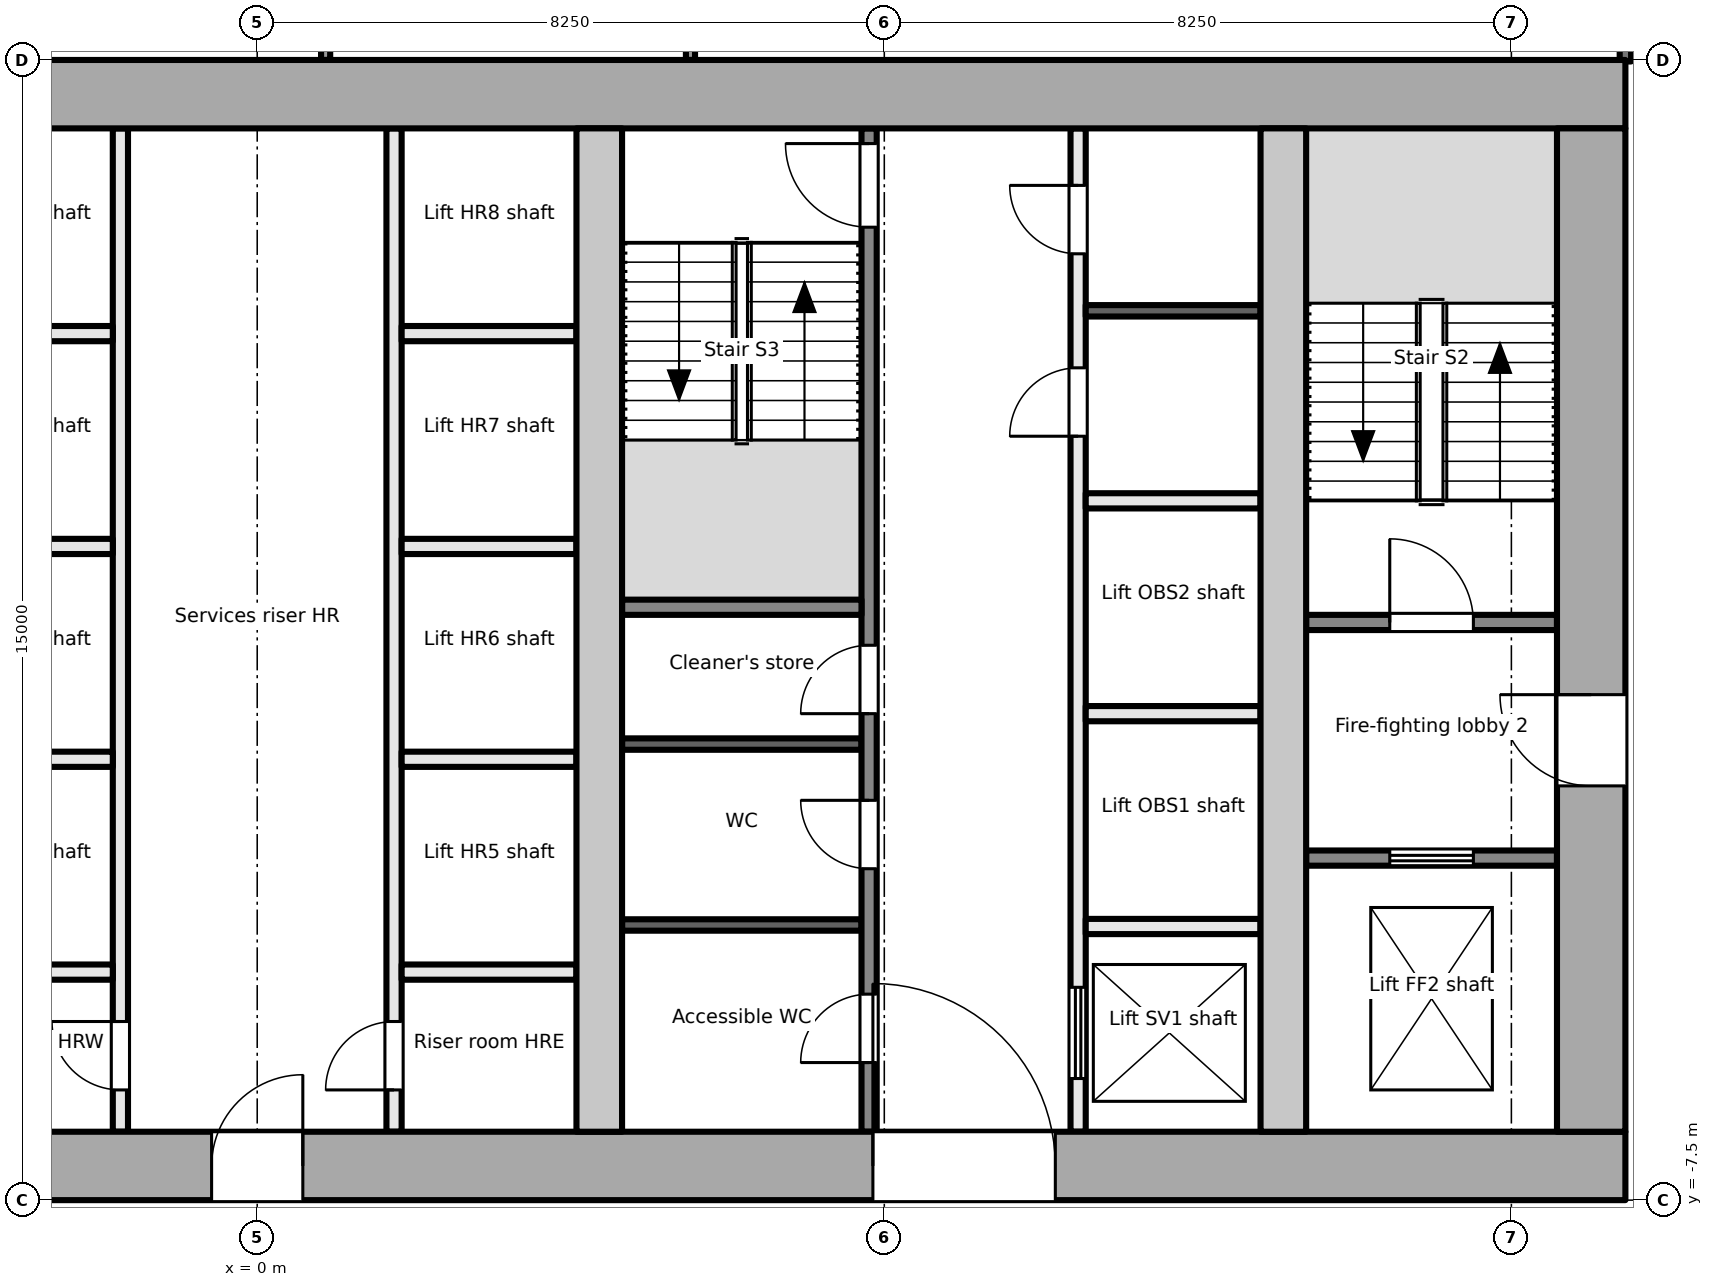
"""IFC4 building model, lengths in metres.
Left out: names, types, materials, properties, quantities, classifications, styles, units other than length and angle.
Written with IfcOpenShell. Run it as: python <this file> out.ifc"""

import sys

from ifc_helpers import new_model, si_unit, direction, frame, frame_2d, origin, place, context, subcontext, project, spatial, rectangle, extrude, element, fill, save


model = new_model("IFC4")
c1 = context("Model", 3, precision=1e-05, world=origin(), true_north=direction((0.0, 1.0)))
c2 = subcontext(c1, "Body", "Model", "MODEL_VIEW")
j1 = project(units=[si_unit("LENGTHUNIT", "METRE"), si_unit("PLANEANGLEUNIT", "RADIAN")], contexts=[c1])
p1 = place(None, origin())
s1 = spatial("IfcSite", under=j1, at=p1, CompositionType="ELEMENT")
p2 = place(p1, origin())
s2 = spatial("IfcBuilding", under=s1, at=p2, CompositionType="ELEMENT")
p3 = place(p2, frame((0.0, 0.0, 107.7)))
s3 = spatial("IfcBuildingStorey", under=s2, at=p3, CompositionType="ELEMENT", Elevation=107.7)
p4 = place(p3, frame((-18.0, -7.05, -0.2), z_axis=(0.0, 0.0, 1.0), x_axis=(1.0, 0.0, 0.0)))
e1 = element("IfcWall", 1, at=p4, inside=s3, PredefinedType="SHEAR", context=c2, shape_type="SweptSolid", body=[
    extrude(rectangle(XDim=36.0, YDim=0.9, at=frame_2d((18.0, 0.0))), origin(), (0.0, 0.0, 1.0), 4.0),
])
p5 = place(p4, frame((7.8, 0.0, 0.2)))
e2 = element("IfcOpeningElement", 2, at=p5, cuts=e1, PredefinedType="OPENING", context=c2, shape_type="SweptSolid", body=[
    extrude(rectangle(XDim=2.4, YDim=2.1, at=frame_2d((1.2, 1.05))), frame((0.0, 0.46, 0.0), z_axis=(0.0, -1.0, 0.0), x_axis=(1.0, 0.0, 0.0)), (0.0, 0.0, 1.0), 0.921),
])
p6 = place(p4, frame((17.4, 0.0, 0.2)))
e3 = element("IfcOpeningElement", 3, at=p6, cuts=e1, PredefinedType="OPENING", context=c2, shape_type="SweptSolid", body=[
    extrude(rectangle(XDim=1.2, YDim=2.1, at=frame_2d((0.6, 1.05))), frame((0.0, 0.46, 0.0), z_axis=(0.0, -1.0, 0.0), x_axis=(1.0, 0.0, 0.0)), (0.0, 0.0, 1.0), 0.921),
])
p7 = place(p4, frame((26.1, 0.0, 0.2)))
e4 = element("IfcOpeningElement", 4, at=p7, cuts=e1, PredefinedType="OPENING", context=c2, shape_type="SweptSolid", body=[
    extrude(rectangle(XDim=2.4, YDim=2.1, at=frame_2d((1.2, 1.05))), frame((0.0, 0.46, 0.0), z_axis=(0.0, -1.0, 0.0), x_axis=(1.0, 0.0, 0.0)), (0.0, 0.0, 1.0), 0.921),
])
p8 = place(p3, frame((-18.0, 7.05, -0.2), z_axis=(0.0, 0.0, 1.0), x_axis=(1.0, 0.0, 0.0)))
e5 = element("IfcWall", 5, at=p8, inside=s3, PredefinedType="SHEAR", context=c2, shape_type="SweptSolid", body=[
    extrude(rectangle(XDim=36.0, YDim=0.9, at=frame_2d((18.0, 0.0))), origin(), (0.0, 0.0, 1.0), 4.0),
])
p9 = place(p3, frame((17.55, -6.6, -0.2), z_axis=(0.0, 0.0, 1.0), x_axis=(0.0, 1.0, 0.0)))
e6 = element("IfcWall", 6, at=p9, inside=s3, PredefinedType="SHEAR", context=c2, shape_type="SweptSolid", body=[
    extrude(rectangle(XDim=13.2, YDim=0.9, at=frame_2d((6.6, 0.0))), origin(), (0.0, 0.0, 1.0), 4.0),
])
p10 = place(p9, frame((4.55, 0.0, 0.2)))
e7 = element("IfcOpeningElement", 7, at=p10, cuts=e6, PredefinedType="OPENING", context=c2, shape_type="SweptSolid", body=[
    extrude(rectangle(XDim=1.2, YDim=2.1, at=frame_2d((0.6, 1.05))), frame((0.0, 0.46, 0.0), z_axis=(0.0, -1.0, 0.0), x_axis=(1.0, 0.0, 0.0)), (0.0, 0.0, 1.0), 0.921),
])
for number, where, z_axis, x_axis in (
    (8, (4.5, -6.6, -0.2), (0.0, 0.0, 1.0), (0.0, 1.0, 0.0)),
    (9, (13.5, -6.6, -0.2), (0.0, 0.0, 1.0), (0.0, 1.0, 0.0)),
):
    element("IfcWall", number, at=place(p3, frame(where, z_axis=z_axis, x_axis=x_axis)), inside=s3, PredefinedType="SHEAR", context=c2, shape_type="SweptSolid", body=[
        extrude(rectangle(XDim=13.2, YDim=0.6, at=frame_2d((6.6, 0.0))), origin(), (0.0, 0.0, 1.0), 4.0),
    ])
p11 = place(p3, frame((13.8, -3.0, 0.0), z_axis=(0.0, 0.0, 1.0), x_axis=(1.0, 0.0, 0.0)))
e10 = element("IfcWall", 10, at=p11, inside=s3, PredefinedType="PARTITIONING", context=c2, shape_type="SweptSolid", body=[
    extrude(rectangle(XDim=3.3, YDim=0.2, at=frame_2d((1.65, 0.0))), origin(), (0.0, 0.0, 1.0), 3.8),
])
p12 = place(p11, frame((1.1, 0.0, 0.0)))
e11 = element("IfcOpeningElement", 11, at=p12, cuts=e10, PredefinedType="OPENING", context=c2, shape_type="SweptSolid", body=[
    extrude(rectangle(XDim=1.1, YDim=2.1, at=frame_2d((0.55, 1.05))), frame((0.0, 0.111, 0.0), z_axis=(0.0, -1.0, 0.0), x_axis=(1.0, 0.0, 0.0)), (0.0, 0.0, 1.0), 0.221),
])
p13 = place(p3, frame((13.8, 0.1, 0.0), z_axis=(0.0, 0.0, 1.0), x_axis=(1.0, 0.0, 0.0)))
e12 = element("IfcWall", 12, at=p13, inside=s3, PredefinedType="PARTITIONING", context=c2, shape_type="SweptSolid", body=[
    extrude(rectangle(XDim=3.3, YDim=0.2, at=frame_2d((1.65, 0.0))), origin(), (0.0, 0.0, 1.0), 3.8),
])
p14 = place(p13, frame((1.1, 0.0, 0.0)))
e13 = element("IfcOpeningElement", 13, at=p14, cuts=e12, PredefinedType="OPENING", context=c2, shape_type="SweptSolid", body=[
    extrude(rectangle(XDim=1.1, YDim=2.1, at=frame_2d((0.55, 1.05))), frame((0.0, 0.111, 0.0), z_axis=(0.0, -1.0, 0.0), x_axis=(1.0, 0.0, 0.0)), (0.0, 0.0, 1.0), 0.221),
])
p15 = place(p3, frame((-1.8, -6.6, 0.0), z_axis=(0.0, 0.0, 1.0), x_axis=(0.0, 1.0, 0.0)))
e14 = element("IfcWall", 14, at=p15, inside=s3, PredefinedType="PARTITIONING", context=c2, shape_type="SweptSolid", body=[
    extrude(rectangle(XDim=13.2, YDim=0.2, at=frame_2d((6.6, 0.0))), origin(), (0.0, 0.0, 1.0), 3.8),
])
p16 = place(p15, frame((0.55, 0.0, 0.0)))
e15 = element("IfcOpeningElement", 15, at=p16, cuts=e14, PredefinedType="OPENING", context=c2, shape_type="SweptSolid", body=[
    extrude(rectangle(XDim=0.9, YDim=2.1, at=frame_2d((0.45, 1.05))), frame((0.0, 0.111, 0.0), z_axis=(0.0, -1.0, 0.0), x_axis=(1.0, 0.0, 0.0)), (0.0, 0.0, 1.0), 0.221),
])
p17 = place(p3, frame((1.8, -6.6, 0.0), z_axis=(0.0, 0.0, 1.0), x_axis=(0.0, 1.0, 0.0)))
e16 = element("IfcWall", 16, at=p17, inside=s3, PredefinedType="PARTITIONING", context=c2, shape_type="SweptSolid", body=[
    extrude(rectangle(XDim=13.2, YDim=0.2, at=frame_2d((6.6, 0.0))), origin(), (0.0, 0.0, 1.0), 3.8),
])
p18 = place(p17, frame((0.55, 0.0, 0.0)))
e17 = element("IfcOpeningElement", 17, at=p18, cuts=e16, PredefinedType="OPENING", context=c2, shape_type="SweptSolid", body=[
    extrude(rectangle(XDim=0.9, YDim=2.1, at=frame_2d((0.45, 1.05))), frame((0.0, 0.111, 0.0), z_axis=(0.0, -1.0, 0.0), x_axis=(1.0, 0.0, 0.0)), (0.0, 0.0, 1.0), 0.221),
])
for number, where, z_axis, x_axis in (
    (18, (-4.2, -1.7, 0.0), (0.0, 0.0, 1.0), (1.0, 0.0, 0.0)),
    (19, (-4.2, 1.1, 0.0), (0.0, 0.0, 1.0), (1.0, 0.0, 0.0)),
    (20, (-4.2, 3.9, 0.0), (0.0, 0.0, 1.0), (1.0, 0.0, 0.0)),
    (21, (-4.2, -4.5, 0.0), (0.0, 0.0, 1.0), (1.0, 0.0, 0.0)),
    (22, (1.9, -1.7, 0.0), (0.0, 0.0, 1.0), (1.0, 0.0, 0.0)),
    (23, (1.9, 1.1, 0.0), (0.0, 0.0, 1.0), (1.0, 0.0, 0.0)),
    (24, (1.9, 3.9, 0.0), (0.0, 0.0, 1.0), (1.0, 0.0, 0.0)),
    (25, (1.9, -4.5, 0.0), (0.0, 0.0, 1.0), (1.0, 0.0, 0.0)),
):
    element("IfcWall", number, at=place(p3, frame(where, z_axis=z_axis, x_axis=x_axis)), inside=s3, PredefinedType="PARTITIONING", context=c2, shape_type="SweptSolid", body=[
        extrude(rectangle(XDim=2.3, YDim=0.2, at=frame_2d((1.15, 0.0))), origin(), (0.0, 0.0, 1.0), 3.8),
    ])
p19 = place(p3, frame((8.05, -6.6, 0.0), z_axis=(0.0, 0.0, 1.0), x_axis=(0.0, 1.0, 0.0)))
e26 = element("IfcWall", 26, at=p19, inside=s3, PredefinedType="PARTITIONING", context=c2, shape_type="SweptSolid", body=[
    extrude(rectangle(XDim=13.2, YDim=0.2, at=frame_2d((6.6, 0.0))), origin(), (0.0, 0.0, 1.0), 3.8),
])
p20 = place(p19, frame((0.91, 0.0, 0.0)))
e27 = element("IfcOpeningElement", 27, at=p20, cuts=e26, PredefinedType="OPENING", context=c2, shape_type="SweptSolid", body=[
    extrude(rectangle(XDim=0.9, YDim=2.1, at=frame_2d((0.45, 1.05))), frame((0.0, 0.111, 0.0), z_axis=(0.0, -1.0, 0.0), x_axis=(1.0, 0.0, 0.0)), (0.0, 0.0, 1.0), 0.221),
])
p21 = place(p19, frame((3.46, 0.0, 0.0)))
e28 = element("IfcOpeningElement", 28, at=p21, cuts=e26, PredefinedType="OPENING", context=c2, shape_type="SweptSolid", body=[
    extrude(rectangle(XDim=0.9, YDim=2.1, at=frame_2d((0.45, 1.05))), frame((0.0, 0.111, 0.0), z_axis=(0.0, -1.0, 0.0), x_axis=(1.0, 0.0, 0.0)), (0.0, 0.0, 1.0), 0.221),
])
p22 = place(p19, frame((5.5, 0.0, 0.0)))
e29 = element("IfcOpeningElement", 29, at=p22, cuts=e26, PredefinedType="OPENING", context=c2, shape_type="SweptSolid", body=[
    extrude(rectangle(XDim=0.9, YDim=2.1, at=frame_2d((0.45, 1.05))), frame((0.0, 0.111, 0.0), z_axis=(0.0, -1.0, 0.0), x_axis=(1.0, 0.0, 0.0)), (0.0, 0.0, 1.0), 0.221),
])
p23 = place(p19, frame((11.9, 0.0, 0.0)))
e30 = element("IfcOpeningElement", 30, at=p23, cuts=e26, PredefinedType="OPENING", context=c2, shape_type="SweptSolid", body=[
    extrude(rectangle(XDim=1.1, YDim=2.1, at=frame_2d((0.55, 1.05))), frame((0.0, 0.111, 0.0), z_axis=(0.0, -1.0, 0.0), x_axis=(1.0, 0.0, 0.0)), (0.0, 0.0, 1.0), 0.221),
])
p24 = place(p3, frame((10.8, -6.6, 0.0), z_axis=(0.0, 0.0, 1.0), x_axis=(0.0, 1.0, 0.0)))
e31 = element("IfcWall", 31, at=p24, inside=s3, PredefinedType="PARTITIONING", context=c2, shape_type="SweptSolid", body=[
    extrude(rectangle(XDim=13.2, YDim=0.2, at=frame_2d((6.6, 0.0))), origin(), (0.0, 0.0, 1.0), 3.8),
])
p25 = place(p24, frame((0.7, 0.0, 0.0)))
e32 = element("IfcOpeningElement", 32, at=p25, cuts=e31, PredefinedType="OPENING", context=c2, shape_type="SweptSolid", body=[
    extrude(rectangle(XDim=1.2, YDim=2.1, at=frame_2d((0.6, 1.05))), frame((0.0, 0.111, 0.0), z_axis=(0.0, -1.0, 0.0), x_axis=(1.0, 0.0, 0.0)), (0.0, 0.0, 1.0), 0.221),
])
p26 = place(p24, frame((9.15, 0.0, 0.0)))
e33 = element("IfcOpeningElement", 33, at=p26, cuts=e31, PredefinedType="OPENING", context=c2, shape_type="SweptSolid", body=[
    extrude(rectangle(XDim=0.9, YDim=2.1, at=frame_2d((0.45, 1.05))), frame((0.0, 0.111, 0.0), z_axis=(0.0, -1.0, 0.0), x_axis=(1.0, 0.0, 0.0)), (0.0, 0.0, 1.0), 0.221),
])
p27 = place(p24, frame((11.55, 0.0, 0.0)))
e34 = element("IfcOpeningElement", 34, at=p27, cuts=e31, PredefinedType="OPENING", context=c2, shape_type="SweptSolid", body=[
    extrude(rectangle(XDim=0.9, YDim=2.1, at=frame_2d((0.45, 1.05))), frame((0.0, 0.111, 0.0), z_axis=(0.0, -1.0, 0.0), x_axis=(1.0, 0.0, 0.0)), (0.0, 0.0, 1.0), 0.221),
])
p28 = place(p3, frame((4.8, 0.3, 0.0), z_axis=(0.0, 0.0, 1.0), x_axis=(1.0, 0.0, 0.0)))
e35 = element("IfcWall", 35, at=p28, inside=s3, PredefinedType="PARTITIONING", context=c2, shape_type="SweptSolid", body=[
    extrude(rectangle(XDim=3.15, YDim=0.2, at=frame_2d((1.575, 0.0))), origin(), (0.0, 0.0, 1.0), 3.8),
])
for number, where, z_axis, x_axis in (
    (36, (4.8, -3.88, 0.0), (0.0, 0.0, 1.0), (1.0, 0.0, 0.0)),
    (37, (4.8, -1.5, 0.0), (0.0, 0.0, 1.0), (1.0, 0.0, 0.0)),
):
    element("IfcWall", number, at=place(p3, frame(where, z_axis=z_axis, x_axis=x_axis)), inside=s3, PredefinedType="PARTITIONING", context=c2, shape_type="SweptSolid", body=[
        extrude(rectangle(XDim=3.15, YDim=0.15, at=frame_2d((1.575, 0.0))), origin(), (0.0, 0.0, 1.0), 3.8),
    ])
for number, where, z_axis, x_axis in (
    (38, (10.9, -3.9, 0.0), (0.0, 0.0, 1.0), (1.0, 0.0, 0.0)),
    (39, (10.9, -1.1, 0.0), (0.0, 0.0, 1.0), (1.0, 0.0, 0.0)),
    (40, (10.9, 1.7, 0.0), (0.0, 0.0, 1.0), (1.0, 0.0, 0.0)),
):
    element("IfcWall", number, at=place(p3, frame(where, z_axis=z_axis, x_axis=x_axis)), inside=s3, PredefinedType="PARTITIONING", context=c2, shape_type="SweptSolid", body=[
        extrude(rectangle(XDim=2.3, YDim=0.2, at=frame_2d((1.15, 0.0))), origin(), (0.0, 0.0, 1.0), 3.8),
    ])
p29 = place(p3, frame((10.9, 4.2, 0.0), z_axis=(0.0, 0.0, 1.0), x_axis=(1.0, 0.0, 0.0)))
e41 = element("IfcWall", 41, at=p29, inside=s3, PredefinedType="PARTITIONING", context=c2, shape_type="SweptSolid", body=[
    extrude(rectangle(XDim=2.3, YDim=0.15, at=frame_2d((1.15, 0.0))), origin(), (0.0, 0.0, 1.0), 3.8),
])
p30 = place(p3, frame((18.0, 7.48, 0.0), z_axis=(0.0, 0.0, 1.0), x_axis=(0.0, 1.0, 0.0)))
e42 = element("IfcWall", 42, at=p30, inside=s3, PredefinedType="PARTITIONING", context=c2, shape_type="SweptSolid", body=[
    extrude(rectangle(XDim=3.26, YDim=0.15, at=frame_2d((1.63, 0.0))), origin(), (0.0, 0.0, 1.0), 2.8),
])
p31 = place(p30, frame((1.645, 0.0, 0.0)))
e43 = element("IfcOpeningElement", 43, at=p31, cuts=e42, PredefinedType="OPENING", context=c2, shape_type="SweptSolid", body=[
    extrude(rectangle(XDim=0.9, YDim=2.1, at=frame_2d((0.45, 1.05))), frame((0.0, 0.085, 0.0), z_axis=(0.0, -1.0, 0.0), x_axis=(1.0, 0.0, 0.0)), (0.0, 0.0, 1.0), 0.171),
])
p32 = place(p3, frame((5.7, 7.5, 0.0), z_axis=(0.0, 0.0, 1.0), x_axis=(0.0, 1.0, 0.0)))
e44 = element("IfcWall", 44, at=p32, inside=s3, PredefinedType="PARTITIONING", context=c2, shape_type="SweptSolid", body=[
    extrude(rectangle(XDim=2.94, YDim=0.12, at=frame_2d((1.47, 0.0))), origin(), (0.0, 0.0, 1.0), 3.8),
])
p33 = place(p32, frame((0.712, 0.0, 0.0)))
e45 = element("IfcOpeningElement", 45, at=p33, cuts=e44, PredefinedType="OPENING", context=c2, shape_type="SweptSolid", body=[
    extrude(rectangle(XDim=0.9, YDim=2.1, at=frame_2d((0.45, 1.05))), frame((0.0, 0.071, 0.0), z_axis=(0.0, -1.0, 0.0), x_axis=(1.0, 0.0, 0.0)), (0.0, 0.0, 1.0), 0.141),
])
p34 = place(p3, frame((0.9, 10.44, 0.0), z_axis=(0.0, 0.0, 1.0), x_axis=(0.0, -1.0, 0.0)))
e46 = element("IfcWall", 46, at=p34, inside=s3, PredefinedType="PARTITIONING", context=c2, shape_type="SweptSolid", body=[
    extrude(rectangle(XDim=2.94, YDim=0.12, at=frame_2d((1.47, 0.0))), origin(), (0.0, 0.0, 1.0), 3.8),
])
p35 = place(p12, origin())
e47 = element("IfcDoor", 47, at=p35, inside=s3, OperationType="DOUBLE_DOOR_SLIDING", PredefinedType="DOOR", context=c2, shape_type="SweptSolid", body=[
    extrude(rectangle(XDim=1.1, YDim=2.1, at=frame_2d((0.55, 1.05))), frame((0.0, 0.025, 0.0), z_axis=(0.0, -1.0, 0.0), x_axis=(1.0, 0.0, 0.0)), (0.0, 0.0, 1.0), 0.05),
])
fill(e11, e47)
p36 = place(p10, origin())
e48 = element("IfcDoor", 48, at=p36, inside=s3, OperationType="SINGLE_SWING_RIGHT", PredefinedType="DOOR", context=c2, shape_type="SweptSolid", body=[
    extrude(rectangle(XDim=1.2, YDim=2.1, at=frame_2d((0.6, 1.05))), frame((0.0, 0.025, 0.0), z_axis=(0.0, -1.0, 0.0), x_axis=(1.0, 0.0, 0.0)), (0.0, 0.0, 1.0), 0.05),
])
fill(e7, e48)
p37 = place(p14, origin())
e49 = element("IfcDoor", 49, at=p37, inside=s3, OperationType="SINGLE_SWING_LEFT", PredefinedType="DOOR", context=c2, shape_type="SweptSolid", body=[
    extrude(rectangle(XDim=1.1, YDim=2.1, at=frame_2d((0.55, 1.05))), frame((0.0, 0.025, 0.0), z_axis=(0.0, -1.0, 0.0), x_axis=(1.0, 0.0, 0.0)), (0.0, 0.0, 1.0), 0.05),
])
fill(e13, e49)
p38 = place(p16, origin())
e50 = element("IfcDoor", 50, at=p38, inside=s3, OperationType="SINGLE_SWING_RIGHT", PredefinedType="DOOR", context=c2, shape_type="SweptSolid", body=[
    extrude(rectangle(XDim=0.9, YDim=2.1, at=frame_2d((0.45, 1.05))), frame((0.0, 0.025, 0.0), z_axis=(0.0, -1.0, 0.0), x_axis=(1.0, 0.0, 0.0)), (0.0, 0.0, 1.0), 0.05),
])
fill(e15, e50)
p39 = place(p18, origin())
e51 = element("IfcDoor", 51, at=p39, inside=s3, OperationType="SINGLE_SWING_LEFT", PredefinedType="DOOR", context=c2, shape_type="SweptSolid", body=[
    extrude(rectangle(XDim=0.9, YDim=2.1, at=frame_2d((0.45, 1.05))), frame((0.0, 0.025, 0.0), z_axis=(0.0, -1.0, 0.0), x_axis=(1.0, 0.0, 0.0)), (0.0, 0.0, 1.0), 0.05),
])
fill(e17, e51)
p40 = place(p6, origin())
e52 = element("IfcDoor", 52, at=p40, inside=s3, OperationType="SINGLE_SWING_RIGHT", PredefinedType="DOOR", context=c2, shape_type="SweptSolid", body=[
    extrude(rectangle(XDim=1.2, YDim=2.1, at=frame_2d((0.6, 1.05))), frame((0.0, 0.025, 0.0), z_axis=(0.0, -1.0, 0.0), x_axis=(1.0, 0.0, 0.0)), (0.0, 0.0, 1.0), 0.05),
])
fill(e3, e52)
p41 = place(p20, origin())
e53 = element("IfcDoor", 53, at=p41, inside=s3, OperationType="SINGLE_SWING_LEFT", PredefinedType="DOOR", context=c2, shape_type="SweptSolid", body=[
    extrude(rectangle(XDim=0.9, YDim=2.1, at=frame_2d((0.45, 1.05))), frame((0.0, 0.025, 0.0), z_axis=(0.0, -1.0, 0.0), x_axis=(1.0, 0.0, 0.0)), (0.0, 0.0, 1.0), 0.05),
])
fill(e27, e53)
p42 = place(p21, origin())
e54 = element("IfcDoor", 54, at=p42, inside=s3, OperationType="SINGLE_SWING_RIGHT", PredefinedType="DOOR", context=c2, shape_type="SweptSolid", body=[
    extrude(rectangle(XDim=0.9, YDim=2.1, at=frame_2d((0.45, 1.05))), frame((0.0, 0.025, 0.0), z_axis=(0.0, -1.0, 0.0), x_axis=(1.0, 0.0, 0.0)), (0.0, 0.0, 1.0), 0.05),
])
fill(e28, e54)
p43 = place(p22, origin())
e55 = element("IfcDoor", 55, at=p43, inside=s3, OperationType="SINGLE_SWING_LEFT", PredefinedType="DOOR", context=c2, shape_type="SweptSolid", body=[
    extrude(rectangle(XDim=0.9, YDim=2.1, at=frame_2d((0.45, 1.05))), frame((0.0, 0.025, 0.0), z_axis=(0.0, -1.0, 0.0), x_axis=(1.0, 0.0, 0.0)), (0.0, 0.0, 1.0), 0.05),
])
fill(e29, e55)
p44 = place(p23, origin())
e56 = element("IfcDoor", 56, at=p44, inside=s3, OperationType="SINGLE_SWING_RIGHT", PredefinedType="DOOR", context=c2, shape_type="SweptSolid", body=[
    extrude(rectangle(XDim=1.1, YDim=2.1, at=frame_2d((0.55, 1.05))), frame((0.0, 0.025, 0.0), z_axis=(0.0, -1.0, 0.0), x_axis=(1.0, 0.0, 0.0)), (0.0, 0.0, 1.0), 0.05),
])
fill(e30, e56)
p45 = place(p7, origin())
e57 = element("IfcDoor", 57, at=p45, inside=s3, OperationType="DOUBLE_DOOR_DOUBLE_SWING", PredefinedType="DOOR", context=c2, shape_type="SweptSolid", body=[
    extrude(rectangle(XDim=2.4, YDim=2.1, at=frame_2d((1.2, 1.05))), frame((0.0, 0.025, 0.0), z_axis=(0.0, -1.0, 0.0), x_axis=(1.0, 0.0, 0.0)), (0.0, 0.0, 1.0), 0.05),
])
fill(e4, e57)
p46 = place(p25, origin())
e58 = element("IfcDoor", 58, at=p46, inside=s3, OperationType="DOUBLE_DOOR_SLIDING", PredefinedType="DOOR", context=c2, shape_type="SweptSolid", body=[
    extrude(rectangle(XDim=1.2, YDim=2.1, at=frame_2d((0.6, 1.05))), frame((0.0, 0.025, 0.0), z_axis=(0.0, -1.0, 0.0), x_axis=(1.0, 0.0, 0.0)), (0.0, 0.0, 1.0), 0.05),
])
fill(e32, e58)
p47 = place(p26, origin())
e59 = element("IfcDoor", 59, at=p47, inside=s3, OperationType="SINGLE_SWING_LEFT", PredefinedType="DOOR", context=c2, shape_type="SweptSolid", body=[
    extrude(rectangle(XDim=0.9, YDim=2.1, at=frame_2d((0.45, 1.05))), frame((0.0, 0.025, 0.0), z_axis=(0.0, -1.0, 0.0), x_axis=(1.0, 0.0, 0.0)), (0.0, 0.0, 1.0), 0.05),
])
fill(e33, e59)
p48 = place(p27, origin())
e60 = element("IfcDoor", 60, at=p48, inside=s3, OperationType="SINGLE_SWING_RIGHT", PredefinedType="DOOR", context=c2, shape_type="SweptSolid", body=[
    extrude(rectangle(XDim=0.9, YDim=2.1, at=frame_2d((0.45, 1.05))), frame((0.0, 0.025, 0.0), z_axis=(0.0, -1.0, 0.0), x_axis=(1.0, 0.0, 0.0)), (0.0, 0.0, 1.0), 0.05),
])
fill(e34, e60)
save(model, sys.argv[1])
